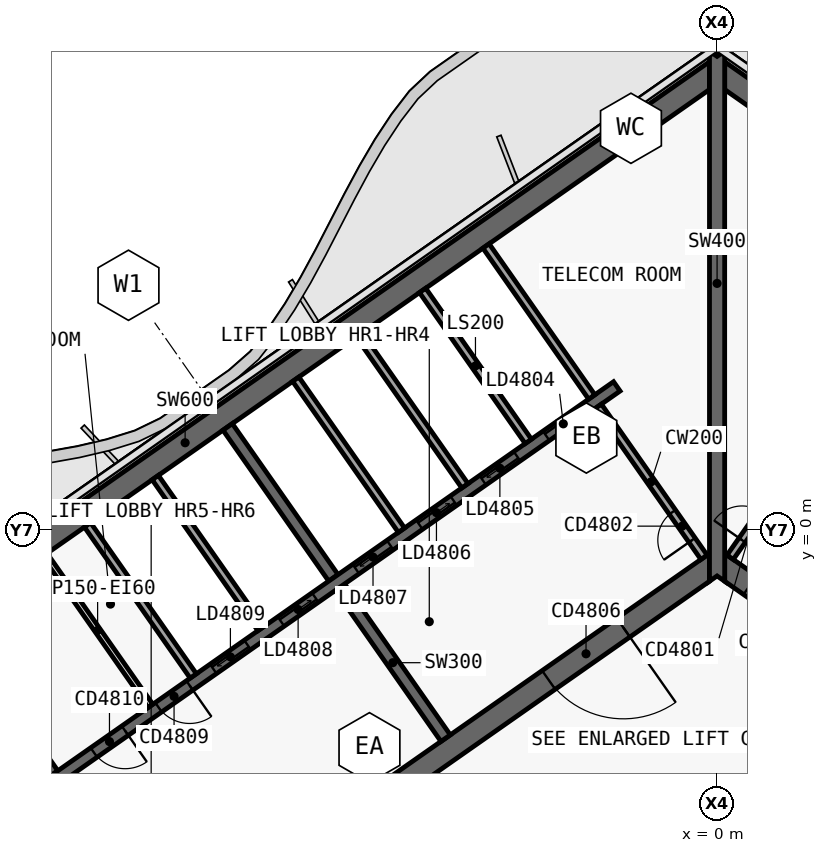
"""IFC4 building model, lengths in metres.
Left out: names, types, materials, properties, quantities, classifications, styles, units other than length and angle.
Written with IfcOpenShell. Run it as: python <this file> out.ifc"""

import sys

from ifc_helpers import new_model, si_unit, direction, frame, frame_2d, origin, place, context, subcontext, project, spatial, polyline, rectangle, outline, extrude, element, fill, save


model = new_model("IFC4")
c1 = context("Model", 3, precision=1e-05, world=origin(), true_north=direction((0.0, 1.0)))
c2 = subcontext(c1, "Body", "Model", "MODEL_VIEW")
j1 = project(units=[si_unit("LENGTHUNIT", "METRE"), si_unit("PLANEANGLEUNIT", "RADIAN")], contexts=[c1])
p1 = place(None, origin())
s1 = spatial("IfcSite", under=j1, at=p1, CompositionType="ELEMENT")
p2 = place(p1, origin())
s2 = spatial("IfcBuilding", under=s1, at=p2, CompositionType="ELEMENT")
p3 = place(p2, frame((0.0, 0.0, 268.3)))
s3 = spatial("IfcBuildingStorey", under=s2, at=p3, CompositionType="ELEMENT", Elevation=268.3)
p4 = place(p3, frame((-0.028, 12.066, 0.0), z_axis=(0.0, 0.0, 1.0), x_axis=(-0.819151382952, -0.573577380837, 0.0)))
e1 = element("IfcWall", 1, at=p4, inside=s3, PredefinedType="SHEAR", context=c2, shape_type="SweptSolid", body=[
    extrude(outline(polyline([(33.898, 0.3), (0.42, 0.3), (0.0, -0.3), (33.898, -0.3), (33.898, 0.3)])), origin(), (0.0, 0.0, 1.0), 3.9),
])
p5 = place(p3, frame((-0.028, -0.874, 0.0), z_axis=(0.0, 0.0, 1.0), x_axis=(-0.819150035022, -0.573579305871, 0.0)))
e2 = element("IfcWall", 2, at=p5, inside=s3, PredefinedType="SHEAR", context=c2, shape_type="SweptSolid", body=[
    extrude(outline(polyline([(26.476, 0.3), (0.42, 0.3), (0.0, -0.3), (26.476, -0.3), (26.476, 0.3)])), origin(), (0.0, 0.0, 1.0), 3.9),
])
p6 = place(p5, frame((2.976, 0.0, 0.0)))
e3 = element("IfcOpeningElement", 3, at=p6, cuts=e2, PredefinedType="OPENING", context=c2, shape_type="SweptSolid", body=[
    extrude(rectangle(XDim=2.4, YDim=2.1, at=frame_2d((1.2, 1.05))), frame((0.0, 0.31, 0.0), z_axis=(0.0, -1.0, 0.0), x_axis=(1.0, 0.0, 0.0)), (0.0, 0.0, 1.0), 0.62),
])
p7 = place(p5, frame((11.776, 0.0, 0.0)))
e4 = element("IfcOpeningElement", 4, at=p7, cuts=e2, PredefinedType="OPENING", context=c2, shape_type="SweptSolid", body=[
    extrude(rectangle(XDim=2.4, YDim=2.1, at=frame_2d((1.2, 1.05))), frame((0.0, 0.31, 0.0), z_axis=(0.0, -1.0, 0.0), x_axis=(1.0, 0.0, 0.0)), (0.0, 0.0, 1.0), 0.62),
])
p8 = place(p3, frame((-7.143, -5.49, 0.0), z_axis=(0.0, 0.0, 1.0), x_axis=(-0.573617744349, 0.819123118565, 0.0)))
e5 = element("IfcWall", 5, at=p8, inside=s3, PredefinedType="SHEAR", context=c2, shape_type="SweptSolid", body=[
    extrude(outline(polyline([(4.85, 0.15), (0.0, 0.15), (0.0, -0.15), (4.85, -0.15), (4.85, 0.15)])), origin(), (0.0, 0.0, 1.0), 3.9),
])
p9 = place(p3, frame((-10.097, -1.271, 0.0), z_axis=(0.0, 0.0, 1.0), x_axis=(-0.573560315113, 0.819163332265, 0.0)))
e6 = element("IfcWall", 6, at=p9, inside=s3, PredefinedType="SHEAR", context=c2, shape_type="SweptSolid", body=[
    extrude(outline(polyline([(4.85, -0.15), (4.85, 0.15), (0.0, 0.15), (0.0, -0.15), (4.85, -0.15)])), origin(), (0.0, 0.0, 1.0), 3.9),
])
p10 = place(p3, frame((-17.469, -6.433, 0.0), z_axis=(0.0, 0.0, 1.0), x_axis=(-0.573594092424, 0.81913968109, 0.0)))
e7 = element("IfcWall", 7, at=p10, inside=s3, PredefinedType="SHEAR", context=c2, shape_type="SweptSolid", body=[
    extrude(outline(polyline([(4.85, -0.15), (4.85, 0.15), (0.0, 0.15), (0.0, -0.15), (4.85, -0.15)])), origin(), (0.0, 0.0, 1.0), 3.9),
])
p11 = place(p3, frame((-2.638, 3.768, 0.0), z_axis=(0.0, 0.0, 1.0), x_axis=(-0.819155014212, -0.573572194837, 0.0)))
e8 = element("IfcWall", 8, at=p11, inside=s3, PredefinedType="SHEAR", context=c2, shape_type="SweptSolid", body=[
    extrude(outline(polyline([(26.4, 0.15), (0.0, 0.15), (0.0, -0.15), (26.4, -0.15), (26.4, 0.15)])), origin(), (0.0, 0.0, 1.0), 3.9),
])
p12 = place(p11, frame((1.169, 0.0, 0.0)))
e9 = element("IfcOpeningElement", 9, at=p12, cuts=e8, PredefinedType="OPENING", context=c2, shape_type="SweptSolid", body=[
    extrude(rectangle(XDim=1.1, YDim=2.1, at=frame_2d((0.55, 1.05))), frame((0.0, 0.16, 0.0), z_axis=(0.0, -1.0, 0.0), x_axis=(1.0, 0.0, 0.0)), (0.0, 0.0, 1.0), 0.32),
])
p13 = place(p11, frame((3.206, 0.0, 0.0)))
e10 = element("IfcOpeningElement", 10, at=p13, cuts=e8, PredefinedType="OPENING", context=c2, shape_type="SweptSolid", body=[
    extrude(rectangle(XDim=1.1, YDim=2.1, at=frame_2d((0.55, 1.05))), frame((0.0, 0.16, 0.0), z_axis=(0.0, -1.0, 0.0), x_axis=(1.0, 0.0, 0.0)), (0.0, 0.0, 1.0), 0.32),
])
p14 = place(p11, frame((5.244, 0.0, 0.0)))
e11 = element("IfcOpeningElement", 11, at=p14, cuts=e8, PredefinedType="OPENING", context=c2, shape_type="SweptSolid", body=[
    extrude(rectangle(XDim=1.1, YDim=2.1, at=frame_2d((0.55, 1.05))), frame((0.0, 0.16, 0.0), z_axis=(0.0, -1.0, 0.0), x_axis=(1.0, 0.0, 0.0)), (0.0, 0.0, 1.0), 0.32),
])
p15 = place(p11, frame((7.281, 0.0, 0.0)))
e12 = element("IfcOpeningElement", 12, at=p15, cuts=e8, PredefinedType="OPENING", context=c2, shape_type="SweptSolid", body=[
    extrude(rectangle(XDim=1.1, YDim=2.1, at=frame_2d((0.55, 1.05))), frame((0.0, 0.16, 0.0), z_axis=(0.0, -1.0, 0.0), x_axis=(1.0, 0.0, 0.0)), (0.0, 0.0, 1.0), 0.32),
])
p16 = place(p11, frame((9.688, 0.0, 0.0)))
e13 = element("IfcOpeningElement", 13, at=p16, cuts=e8, PredefinedType="OPENING", context=c2, shape_type="SweptSolid", body=[
    extrude(rectangle(XDim=1.1, YDim=2.1, at=frame_2d((0.55, 1.05))), frame((0.0, 0.16, 0.0), z_axis=(0.0, -1.0, 0.0), x_axis=(1.0, 0.0, 0.0)), (0.0, 0.0, 1.0), 0.32),
])
p17 = place(p11, frame((11.863, 0.0, 0.0)))
e14 = element("IfcOpeningElement", 14, at=p17, cuts=e8, PredefinedType="OPENING", context=c2, shape_type="SweptSolid", body=[
    extrude(rectangle(XDim=1.1, YDim=2.1, at=frame_2d((0.55, 1.05))), frame((0.0, 0.16, 0.0), z_axis=(0.0, -1.0, 0.0), x_axis=(1.0, 0.0, 0.0)), (0.0, 0.0, 1.0), 0.32),
])
p18 = place(p11, frame((13.722, 0.0, 0.0)))
e15 = element("IfcOpeningElement", 15, at=p18, cuts=e8, PredefinedType="OPENING", context=c2, shape_type="SweptSolid", body=[
    extrude(rectangle(XDim=1.0, YDim=2.1, at=frame_2d((0.5, 1.05))), frame((0.0, 0.16, 0.0), z_axis=(0.0, -1.0, 0.0), x_axis=(1.0, 0.0, 0.0)), (0.0, 0.0, 1.0), 0.32),
])
p19 = place(p11, frame((15.798, 0.0, 0.0)))
e16 = element("IfcOpeningElement", 16, at=p19, cuts=e8, PredefinedType="OPENING", context=c2, shape_type="SweptSolid", body=[
    extrude(rectangle(XDim=1.0, YDim=2.1, at=frame_2d((0.5, 1.05))), frame((0.0, 0.16, 0.0), z_axis=(0.0, -1.0, 0.0), x_axis=(1.0, 0.0, 0.0)), (0.0, 0.0, 1.0), 0.32),
])
p20 = place(p3, frame((0.028, 12.066, 0.0), z_axis=(0.0, 0.0, 1.0), x_axis=(0.819151382952, -0.573577380837, 0.0)))
e17 = element("IfcWall", 17, at=p20, inside=s3, PredefinedType="SHEAR", context=c2, shape_type="SweptSolid", body=[
    extrude(outline(polyline([(33.898, 0.3), (0.0, 0.3), (0.42, -0.3), (33.898, -0.3), (33.898, 0.3)])), origin(), (0.0, 0.0, 1.0), 3.9),
])
p21 = place(p3, frame((0.028, -0.874, 0.0), z_axis=(0.0, 0.0, 1.0), x_axis=(0.819150035022, -0.573579305871, 0.0)))
e18 = element("IfcWall", 18, at=p21, inside=s3, PredefinedType="SHEAR", context=c2, shape_type="SweptSolid", body=[
    extrude(outline(polyline([(26.476, 0.3), (0.0, 0.3), (0.42, -0.3), (26.476, -0.3), (26.476, 0.3)])), origin(), (0.0, 0.0, 1.0), 3.9),
])
p22 = place(p21, frame((1.026, 0.0, 0.0)))
e19 = element("IfcOpeningElement", 19, at=p22, cuts=e18, PredefinedType="OPENING", context=c2, shape_type="SweptSolid", body=[
    extrude(rectangle(XDim=1.5, YDim=2.1, at=frame_2d((0.75, 1.05))), frame((0.0, 0.31, 0.0), z_axis=(0.0, -1.0, 0.0), x_axis=(1.0, 0.0, 0.0)), (0.0, 0.0, 1.0), 0.62),
])
p23 = place(p21, frame((12.226, 0.0, 0.0)))
e20 = element("IfcOpeningElement", 20, at=p23, cuts=e18, PredefinedType="OPENING", context=c2, shape_type="SweptSolid", body=[
    extrude(rectangle(XDim=1.5, YDim=2.1, at=frame_2d((0.75, 1.05))), frame((0.0, 0.31, 0.0), z_axis=(0.0, -1.0, 0.0), x_axis=(1.0, 0.0, 0.0)), (0.0, 0.0, 1.0), 0.62),
])
p24 = place(p3, frame((0.0, -1.361, 0.0), z_axis=(0.0, 0.0, 1.0), x_axis=(0.0, 1.0, 0.0)))
e21 = element("IfcWall", 21, at=p24, inside=s3, PredefinedType="SHEAR", context=c2, shape_type="SweptSolid", body=[
    extrude(outline(polyline([(0.14, 0.2), (0.0, 0.2), (0.14, 0.0), (0.0, -0.2), (0.14, -0.2), (1.012, -0.2), (12.94, -0.2), (13.813, -0.2), (13.893, -0.2), (13.933, -0.172), (13.813, 0.0), (13.933, 0.172), (13.893, 0.2), (13.813, 0.2), (12.94, 0.2), (1.012, 0.2), (0.14, 0.2)])), origin(), (0.0, 0.0, 1.0), 3.9),
])
p25 = place(p3, frame((-4.967, 2.321, 0.0), z_axis=(0.0, 0.0, 1.0), x_axis=(-0.573594092424, 0.81913968109, 0.0)))
e22 = element("IfcWall", 22, at=p25, inside=s3, PredefinedType="SOLIDWALL", context=c2, shape_type="SweptSolid", body=[
    extrude(rectangle(XDim=4.85, YDim=0.2, at=frame_2d((2.425, 0.0))), origin(), (0.0, 0.0, 1.0), 3.9),
])
p26 = place(p3, frame((-6.636, 1.152, 0.0), z_axis=(0.0, 0.0, 1.0), x_axis=(-0.573560315113, 0.819163332265, 0.0)))
e23 = element("IfcWall", 23, at=p26, inside=s3, PredefinedType="SOLIDWALL", context=c2, shape_type="SweptSolid", body=[
    extrude(rectangle(XDim=4.85, YDim=0.2, at=frame_2d((2.425, 0.0))), origin(), (0.0, 0.0, 1.0), 3.9),
])
p27 = place(p3, frame((-8.305, -0.017, 0.0), z_axis=(0.0, 0.0, 1.0), x_axis=(-0.573594092424, 0.81913968109, 0.0)))
e24 = element("IfcWall", 24, at=p27, inside=s3, PredefinedType="SOLIDWALL", context=c2, shape_type="SweptSolid", body=[
    extrude(rectangle(XDim=4.85, YDim=0.2, at=frame_2d((2.425, 0.0))), origin(), (0.0, 0.0, 1.0), 3.9),
])
p28 = place(p3, frame((-14.909, -4.641, 0.0), z_axis=(0.0, 0.0, 1.0), x_axis=(-0.573560315113, 0.819163332265, 0.0)))
e25 = element("IfcWall", 25, at=p28, inside=s3, PredefinedType="PARTITIONING", context=c2, shape_type="SweptSolid", body=[
    extrude(rectangle(XDim=4.85, YDim=0.15, at=frame_2d((2.425, 0.0))), origin(), (0.0, 0.0, 1.0), 3.62),
])
p29 = place(p3, frame((-12.001, -2.605, 0.0), z_axis=(0.0, 0.0, 1.0), x_axis=(-0.573560315113, 0.819163332265, 0.0)))
e26 = element("IfcWall", 26, at=p29, inside=s3, PredefinedType="SOLIDWALL", context=c2, shape_type="SweptSolid", body=[
    extrude(rectangle(XDim=4.85, YDim=0.2, at=frame_2d((2.425, 0.0))), origin(), (0.0, 0.0, 1.0), 3.9),
])
p30 = place(p3, frame((-13.783, -3.852, 0.0), z_axis=(0.0, 0.0, 1.0), x_axis=(-0.573594092424, 0.81913968109, 0.0)))
e27 = element("IfcWall", 27, at=p30, inside=s3, PredefinedType="SOLIDWALL", context=c2, shape_type="SweptSolid", body=[
    extrude(rectangle(XDim=4.85, YDim=0.2, at=frame_2d((2.425, 0.0))), origin(), (0.0, 0.0, 1.0), 3.9),
])
p31 = place(p3, frame((-0.344, -0.729, 0.0), z_axis=(0.0, 0.0, 1.0), x_axis=(-0.573560315113, 0.819163332265, 0.0)))
e28 = element("IfcWall", 28, at=p31, inside=s3, PredefinedType="SOLIDWALL", context=c2, shape_type="SweptSolid", body=[
    extrude(rectangle(XDim=4.85, YDim=0.2, at=frame_2d((2.425, 0.0))), origin(), (0.0, 0.0, 1.0), 3.62),
])
p32 = place(p31, frame((0.55, 0.0, 0.0)))
e29 = element("IfcOpeningElement", 29, at=p32, cuts=e28, PredefinedType="OPENING", context=c2, shape_type="SweptSolid", body=[
    extrude(rectangle(XDim=0.9, YDim=2.1, at=frame_2d((0.45, 1.05))), frame((0.0, 0.11, 0.0), z_axis=(0.0, -1.0, 0.0), x_axis=(1.0, 0.0, 0.0)), (0.0, 0.0, 1.0), 0.22),
])
p33 = place(p3, frame((-3.298, 3.49, 0.0), z_axis=(0.0, 0.0, 1.0), x_axis=(-0.573560315113, 0.819163332265, 0.0)))
e30 = element("IfcWall", 30, at=p33, inside=s3, PredefinedType="SOLIDWALL", context=c2, shape_type="SweptSolid", body=[
    extrude(rectangle(XDim=4.85, YDim=0.2, at=frame_2d((2.425, 0.0))), origin(), (0.0, 0.0, 1.0), 3.62),
])
p34 = place(p3, frame((0.344, -0.729, 0.0), z_axis=(0.0, 0.0, 1.0), x_axis=(0.573560315113, 0.819163332265, 0.0)))
e31 = element("IfcWall", 31, at=p34, inside=s3, PredefinedType="SOLIDWALL", context=c2, shape_type="SweptSolid", body=[
    extrude(rectangle(XDim=4.85, YDim=0.2, at=frame_2d((2.425, 0.0))), origin(), (0.0, 0.0, 1.0), 3.62),
])
p35 = place(p34, frame((0.55, 0.0, 0.0)))
e32 = element("IfcOpeningElement", 32, at=p35, cuts=e31, PredefinedType="OPENING", context=c2, shape_type="SweptSolid", body=[
    extrude(rectangle(XDim=0.9, YDim=2.1, at=frame_2d((0.45, 1.05))), frame((0.0, 0.11, 0.0), z_axis=(0.0, -1.0, 0.0), x_axis=(1.0, 0.0, 0.0)), (0.0, 0.0, 1.0), 0.22),
])
p36 = place(p12, origin())
e33 = element("IfcDoor", 33, at=p36, inside=s3, OperationType="SLIDING_TO_LEFT", PredefinedType="DOOR", context=c2, shape_type="SweptSolid", body=[
    extrude(rectangle(XDim=1.1, YDim=2.1, at=frame_2d((0.55, 1.05))), frame((0.0, 0.025, 0.0), z_axis=(0.0, -1.0, 0.0), x_axis=(1.0, 0.0, 0.0)), (0.0, 0.0, 1.0), 0.05),
])
fill(e9, e33)
p37 = place(p13, origin())
e34 = element("IfcDoor", 34, at=p37, inside=s3, OperationType="SLIDING_TO_RIGHT", PredefinedType="DOOR", context=c2, shape_type="SweptSolid", body=[
    extrude(rectangle(XDim=1.1, YDim=2.1, at=frame_2d((0.55, 1.05))), frame((0.0, 0.025, 0.0), z_axis=(0.0, -1.0, 0.0), x_axis=(1.0, 0.0, 0.0)), (0.0, 0.0, 1.0), 0.05),
])
fill(e10, e34)
p38 = place(p14, origin())
e35 = element("IfcDoor", 35, at=p38, inside=s3, OperationType="SLIDING_TO_LEFT", PredefinedType="DOOR", context=c2, shape_type="SweptSolid", body=[
    extrude(rectangle(XDim=1.1, YDim=2.1, at=frame_2d((0.55, 1.05))), frame((0.0, 0.025, 0.0), z_axis=(0.0, -1.0, 0.0), x_axis=(1.0, 0.0, 0.0)), (0.0, 0.0, 1.0), 0.05),
])
fill(e11, e35)
p39 = place(p15, origin())
e36 = element("IfcDoor", 36, at=p39, inside=s3, OperationType="SLIDING_TO_RIGHT", PredefinedType="DOOR", context=c2, shape_type="SweptSolid", body=[
    extrude(rectangle(XDim=1.1, YDim=2.1, at=frame_2d((0.55, 1.05))), frame((0.0, 0.025, 0.0), z_axis=(0.0, -1.0, 0.0), x_axis=(1.0, 0.0, 0.0)), (0.0, 0.0, 1.0), 0.05),
])
fill(e12, e36)
p40 = place(p16, origin())
e37 = element("IfcDoor", 37, at=p40, inside=s3, OperationType="SLIDING_TO_LEFT", PredefinedType="DOOR", context=c2, shape_type="SweptSolid", body=[
    extrude(rectangle(XDim=1.1, YDim=2.1, at=frame_2d((0.55, 1.05))), frame((0.0, 0.025, 0.0), z_axis=(0.0, -1.0, 0.0), x_axis=(1.0, 0.0, 0.0)), (0.0, 0.0, 1.0), 0.05),
])
fill(e13, e37)
p41 = place(p17, origin())
e38 = element("IfcDoor", 38, at=p41, inside=s3, OperationType="SLIDING_TO_RIGHT", PredefinedType="DOOR", context=c2, shape_type="SweptSolid", body=[
    extrude(rectangle(XDim=1.1, YDim=2.1, at=frame_2d((0.55, 1.05))), frame((0.0, 0.025, 0.0), z_axis=(0.0, -1.0, 0.0), x_axis=(1.0, 0.0, 0.0)), (0.0, 0.0, 1.0), 0.05),
])
fill(e14, e38)
p42 = place(p18, origin())
e39 = element("IfcDoor", 39, at=p42, inside=s3, OperationType="SINGLE_SWING_RIGHT", PredefinedType="DOOR", context=c2, shape_type="SweptSolid", body=[
    extrude(rectangle(XDim=1.0, YDim=2.1, at=frame_2d((0.5, 1.05))), frame((0.0, 0.025, 0.0), z_axis=(0.0, -1.0, 0.0), x_axis=(1.0, 0.0, 0.0)), (0.0, 0.0, 1.0), 0.05),
])
fill(e15, e39)
p43 = place(p19, origin())
e40 = element("IfcDoor", 40, at=p43, inside=s3, OperationType="SINGLE_SWING_RIGHT", PredefinedType="DOOR", context=c2, shape_type="SweptSolid", body=[
    extrude(rectangle(XDim=1.0, YDim=2.1, at=frame_2d((0.5, 1.05))), frame((0.0, 0.025, 0.0), z_axis=(0.0, -1.0, 0.0), x_axis=(1.0, 0.0, 0.0)), (0.0, 0.0, 1.0), 0.05),
])
fill(e16, e40)
p44 = place(p6, origin())
e41 = element("IfcDoor", 41, at=p44, inside=s3, OperationType="DOUBLE_DOOR_SINGLE_SWING", PredefinedType="DOOR", context=c2, shape_type="SweptSolid", body=[
    extrude(rectangle(XDim=2.4, YDim=2.1, at=frame_2d((1.2, 1.05))), frame((0.0, 0.025, 0.0), z_axis=(0.0, -1.0, 0.0), x_axis=(1.0, 0.0, 0.0)), (0.0, 0.0, 1.0), 0.05),
])
fill(e3, e41)
p45 = place(p32, origin())
e42 = element("IfcDoor", 42, at=p45, inside=s3, OperationType="SINGLE_SWING_RIGHT", PredefinedType="DOOR", context=c2, shape_type="SweptSolid", body=[
    extrude(rectangle(XDim=0.9, YDim=2.1, at=frame_2d((0.45, 1.05))), frame((0.0, 0.025, 0.0), z_axis=(0.0, -1.0, 0.0), x_axis=(1.0, 0.0, 0.0)), (0.0, 0.0, 1.0), 0.05),
])
fill(e29, e42)
p46 = place(p35, origin())
e43 = element("IfcDoor", 43, at=p46, inside=s3, OperationType="SINGLE_SWING_RIGHT", PredefinedType="DOOR", context=c2, shape_type="SweptSolid", body=[
    extrude(rectangle(XDim=0.9, YDim=2.1, at=frame_2d((0.45, 1.05))), frame((0.0, 0.025, 0.0), z_axis=(0.0, -1.0, 0.0), x_axis=(1.0, 0.0, 0.0)), (0.0, 0.0, 1.0), 0.05),
])
fill(e32, e43)
save(model, sys.argv[1])
